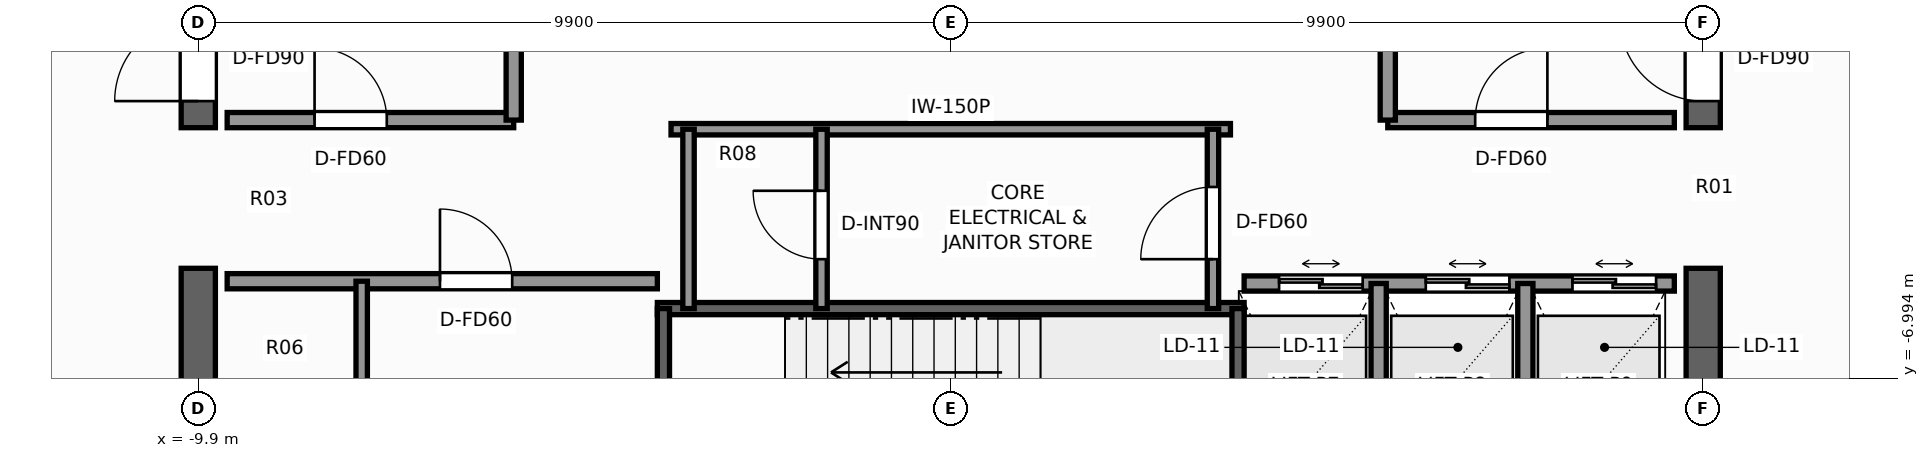
"""IFC4 building model, lengths in metres.
Left out: names, types, materials, properties, quantities, classifications, styles, units other than length and angle.
Written with IfcOpenShell. Run it as: python <this file> out.ifc"""

import sys

from ifc_helpers import new_model, si_unit, direction, frame, frame_2d, origin, place, context, subcontext, project, spatial, rectangle, extrude, element, fill, save


model = new_model("IFC4")
c1 = context("Model", 3, precision=1e-05, world=origin(), true_north=direction((0.0, 1.0)))
c2 = subcontext(c1, "Body", "Model", "MODEL_VIEW")
j1 = project(units=[si_unit("LENGTHUNIT", "METRE"), si_unit("PLANEANGLEUNIT", "RADIAN")], contexts=[c1])
p1 = place(None, origin())
s1 = spatial("IfcSite", under=j1, at=p1, CompositionType="ELEMENT")
p2 = place(p1, origin())
s2 = spatial("IfcBuilding", under=s1, at=p2, CompositionType="ELEMENT")
p3 = place(p2, frame((0.0, 0.0, 258.4)))
s3 = spatial("IfcBuildingStorey", under=s2, at=p3, CompositionType="ELEMENT", Elevation=258.4)
for number, where, z_axis, x_axis in (
    (1, (-9.9, -9.675, 0.0), (0.0, 0.0, 1.0), (0.0, 1.0, 0.0)),
    (2, (9.9, -9.675, 0.0), (0.0, 0.0, 1.0), (0.0, 1.0, 0.0)),
):
    element("IfcWall", number, at=place(p3, frame(where, z_axis=z_axis, x_axis=x_axis)), inside=s3, PredefinedType="SHEAR", context=c2, shape_type="SweptSolid", body=[
        extrude(rectangle(XDim=4.125, YDim=0.45, at=frame_2d((2.062, 0.0))), origin(), (0.0, 0.0, 1.0), 4.4),
    ])
p4 = place(p3, frame((-9.9, -3.7, 0.0), z_axis=(0.0, 0.0, 1.0), x_axis=(0.0, 1.0, 0.0)))
e3 = element("IfcWall", 3, at=p4, inside=s3, PredefinedType="SHEAR", context=c2, shape_type="SweptSolid", body=[
    extrude(rectangle(XDim=13.375, YDim=0.45, at=frame_2d((6.688, 0.0))), origin(), (0.0, 0.0, 1.0), 4.4),
])
p5 = place(p4, frame((0.35, 0.0, 0.0)))
e4 = element("IfcOpeningElement", 4, at=p5, cuts=e3, PredefinedType="OPENING", context=c2, shape_type="SweptSolid", body=[
    extrude(rectangle(XDim=1.1, YDim=2.2, at=frame_2d((0.55, 1.1))), frame((0.0, 0.235, 0.0), z_axis=(0.0, -1.0, 0.0), x_axis=(1.0, 0.0, 0.0)), (0.0, 0.0, 1.0), 0.47),
])
p6 = place(p3, frame((9.9, -3.7, 0.0), z_axis=(0.0, 0.0, 1.0), x_axis=(0.0, 1.0, 0.0)))
e5 = element("IfcWall", 5, at=p6, inside=s3, PredefinedType="SHEAR", context=c2, shape_type="SweptSolid", body=[
    extrude(rectangle(XDim=13.375, YDim=0.45, at=frame_2d((6.688, 0.0))), origin(), (0.0, 0.0, 1.0), 4.4),
])
p7 = place(p6, frame((0.35, 0.0, 0.0)))
e6 = element("IfcOpeningElement", 6, at=p7, cuts=e5, PredefinedType="OPENING", context=c2, shape_type="SweptSolid", body=[
    extrude(rectangle(XDim=1.1, YDim=2.2, at=frame_2d((0.55, 1.1))), frame((0.0, 0.235, 0.0), z_axis=(0.0, -1.0, 0.0), x_axis=(1.0, 0.0, 0.0)), (0.0, 0.0, 1.0), 0.47),
])
p8 = place(p3, frame((-3.86, -6.08, 0.0), z_axis=(0.0, 0.0, 1.0), x_axis=(1.0, 0.0, 0.0)))
e7 = element("IfcWall", 7, at=p8, inside=s3, PredefinedType="SHEAR", context=c2, shape_type="SweptSolid", body=[
    extrude(rectangle(XDim=7.72, YDim=0.16, at=frame_2d((3.86, 0.0))), origin(), (0.0, 0.0, 1.0), 4.4),
])
for number, where, z_axis, x_axis in (
    (8, (-3.78, -9.43, 0.0), (0.0, 0.0, 1.0), (0.0, 1.0, 0.0)),
    (9, (3.78, -9.43, 0.0), (0.0, 0.0, 1.0), (0.0, 1.0, 0.0)),
):
    element("IfcWall", number, at=place(p3, frame(where, z_axis=z_axis, x_axis=x_axis)), inside=s3, PredefinedType="SHEAR", context=c2, shape_type="SweptSolid", body=[
        extrude(rectangle(XDim=3.35, YDim=0.16, at=frame_2d((1.675, 0.0))), origin(), (0.0, 0.0, 1.0), 4.4),
    ])
p9 = place(p3, frame((-9.52, -3.6, 0.0), z_axis=(0.0, 0.0, 1.0), x_axis=(1.0, 0.0, 0.0)))
e10 = element("IfcWall", 10, at=p9, inside=s3, PredefinedType="SOLIDWALL", context=c2, shape_type="SweptSolid", body=[
    extrude(rectangle(XDim=3.77, YDim=0.2, at=frame_2d((1.885, 0.0))), origin(), (0.0, 0.0, 1.0), 4.12),
])
p10 = place(p9, frame((1.15, 0.0, 0.0)))
e11 = element("IfcOpeningElement", 11, at=p10, cuts=e10, PredefinedType="OPENING", context=c2, shape_type="SweptSolid", body=[
    extrude(rectangle(XDim=0.95, YDim=2.06, at=frame_2d((0.475, 1.03))), frame((0.0, 0.11, 0.0), z_axis=(0.0, -1.0, 0.0), x_axis=(1.0, 0.0, 0.0)), (0.0, 0.0, 1.0), 0.22),
])
p11 = place(p3, frame((-5.75, -3.6, 0.0), z_axis=(0.0, 0.0, 1.0), x_axis=(0.0, 1.0, 0.0)))
e12 = element("IfcWall", 12, at=p11, inside=s3, PredefinedType="SOLIDWALL", context=c2, shape_type="SweptSolid", body=[
    extrude(rectangle(XDim=5.57, YDim=0.2, at=frame_2d((2.785, 0.0))), origin(), (0.0, 0.0, 1.0), 4.12),
])
p12 = place(p11, frame((2.75, 0.0, 0.0)))
e13 = element("IfcOpeningElement", 13, at=p12, cuts=e12, PredefinedType="OPENING", context=c2, shape_type="SweptSolid", body=[
    extrude(rectangle(XDim=1.1, YDim=2.2, at=frame_2d((0.55, 1.1))), frame((0.0, 0.11, 0.0), z_axis=(0.0, -1.0, 0.0), x_axis=(1.0, 0.0, 0.0)), (0.0, 0.0, 1.0), 0.22),
])
p13 = place(p3, frame((5.75, -3.6, 0.0), z_axis=(0.0, 0.0, 1.0), x_axis=(1.0, 0.0, 0.0)))
e14 = element("IfcWall", 14, at=p13, inside=s3, PredefinedType="SOLIDWALL", context=c2, shape_type="SweptSolid", body=[
    extrude(rectangle(XDim=3.77, YDim=0.2, at=frame_2d((1.885, 0.0))), origin(), (0.0, 0.0, 1.0), 4.12),
])
p14 = place(p13, frame((1.15, 0.0, 0.0)))
e15 = element("IfcOpeningElement", 15, at=p14, cuts=e14, PredefinedType="OPENING", context=c2, shape_type="SweptSolid", body=[
    extrude(rectangle(XDim=0.95, YDim=2.06, at=frame_2d((0.475, 1.03))), frame((0.0, 0.11, 0.0), z_axis=(0.0, -1.0, 0.0), x_axis=(1.0, 0.0, 0.0)), (0.0, 0.0, 1.0), 0.22),
])
p15 = place(p3, frame((5.75, -3.6, 0.0), z_axis=(0.0, 0.0, 1.0), x_axis=(0.0, 1.0, 0.0)))
e16 = element("IfcWall", 16, at=p15, inside=s3, PredefinedType="SOLIDWALL", context=c2, shape_type="SweptSolid", body=[
    extrude(rectangle(XDim=5.57, YDim=0.2, at=frame_2d((2.785, 0.0))), origin(), (0.0, 0.0, 1.0), 4.12),
])
p16 = place(p15, frame((2.75, 0.0, 0.0)))
e17 = element("IfcOpeningElement", 17, at=p16, cuts=e16, PredefinedType="OPENING", context=c2, shape_type="SweptSolid", body=[
    extrude(rectangle(XDim=1.1, YDim=2.2, at=frame_2d((0.55, 1.1))), frame((0.0, 0.11, 0.0), z_axis=(0.0, -1.0, 0.0), x_axis=(1.0, 0.0, 0.0)), (0.0, 0.0, 1.0), 0.22),
])
p17 = place(p3, frame((-9.52, -5.72, 0.0), z_axis=(0.0, 0.0, 1.0), x_axis=(1.0, 0.0, 0.0)))
e18 = element("IfcWall", 18, at=p17, inside=s3, PredefinedType="SOLIDWALL", context=c2, shape_type="SweptSolid", body=[
    extrude(rectangle(XDim=5.66, YDim=0.2, at=frame_2d((2.83, 0.0))), origin(), (0.0, 0.0, 1.0), 4.12),
])
p18 = place(p17, frame((2.8, 0.0, 0.0)))
e19 = element("IfcOpeningElement", 19, at=p18, cuts=e18, PredefinedType="OPENING", context=c2, shape_type="SweptSolid", body=[
    extrude(rectangle(XDim=0.95, YDim=2.06, at=frame_2d((0.475, 1.03))), frame((0.0, 0.11, 0.0), z_axis=(0.0, -1.0, 0.0), x_axis=(1.0, 0.0, 0.0)), (0.0, 0.0, 1.0), 0.22),
])
p19 = place(p3, frame((-7.75, -9.52, 0.0), z_axis=(0.0, 0.0, 1.0), x_axis=(0.0, 1.0, 0.0)))
e20 = element("IfcWall", 20, at=p19, inside=s3, PredefinedType="PARTITIONING", context=c2, shape_type="SweptSolid", body=[
    extrude(rectangle(XDim=3.8, YDim=0.15, at=frame_2d((1.9, 0.0))), origin(), (0.0, 0.0, 1.0), 4.12),
])
p20 = place(p19, frame((0.9, 0.0, 0.0)))
e21 = element("IfcOpeningElement", 21, at=p20, cuts=e20, PredefinedType="OPENING", context=c2, shape_type="SweptSolid", body=[
    extrude(rectangle(XDim=0.85, YDim=2.03, at=frame_2d((0.425, 1.015))), frame((0.0, 0.085, 0.0), z_axis=(0.0, -1.0, 0.0), x_axis=(1.0, 0.0, 0.0)), (0.0, 0.0, 1.0), 0.17),
])
p21 = place(p3, frame((3.86, -5.75, 0.0), z_axis=(0.0, 0.0, 1.0), x_axis=(1.0, 0.0, 0.0)))
e22 = element("IfcWall", 22, at=p21, inside=s3, PredefinedType="SOLIDWALL", context=c2, shape_type="SweptSolid", body=[
    extrude(rectangle(XDim=5.66, YDim=0.2, at=frame_2d((2.83, 0.0))), origin(), (0.0, 0.0, 1.0), 4.12),
])
p22 = place(p21, frame((0.46, 0.0, 0.0)))
e23 = element("IfcOpeningElement", 23, at=p22, cuts=e22, PredefinedType="OPENING", context=c2, shape_type="SweptSolid", body=[
    extrude(rectangle(XDim=1.1, YDim=2.2, at=frame_2d((0.55, 1.1))), frame((0.0, 0.11, 0.0), z_axis=(0.0, -1.0, 0.0), x_axis=(1.0, 0.0, 0.0)), (0.0, 0.0, 1.0), 0.22),
])
p23 = place(p21, frame((2.39, 0.0, 0.0)))
e24 = element("IfcOpeningElement", 24, at=p23, cuts=e22, PredefinedType="OPENING", context=c2, shape_type="SweptSolid", body=[
    extrude(rectangle(XDim=1.1, YDim=2.2, at=frame_2d((0.55, 1.1))), frame((0.0, 0.11, 0.0), z_axis=(0.0, -1.0, 0.0), x_axis=(1.0, 0.0, 0.0)), (0.0, 0.0, 1.0), 0.22),
])
p24 = place(p21, frame((4.32, 0.0, 0.0)))
e25 = element("IfcOpeningElement", 25, at=p24, cuts=e22, PredefinedType="OPENING", context=c2, shape_type="SweptSolid", body=[
    extrude(rectangle(XDim=1.1, YDim=2.2, at=frame_2d((0.55, 1.1))), frame((0.0, 0.11, 0.0), z_axis=(0.0, -1.0, 0.0), x_axis=(1.0, 0.0, 0.0)), (0.0, 0.0, 1.0), 0.22),
])
for number, where, z_axis, x_axis in (
    (26, (5.63, -9.52, 0.0), (0.0, 0.0, 1.0), (0.0, 1.0, 0.0)),
    (27, (7.56, -9.52, 0.0), (0.0, 0.0, 1.0), (0.0, 1.0, 0.0)),
):
    element("IfcWall", number, at=place(p3, frame(where, z_axis=z_axis, x_axis=x_axis)), inside=s3, PredefinedType="SOLIDWALL", context=c2, shape_type="SweptSolid", body=[
        extrude(rectangle(XDim=3.77, YDim=0.2, at=frame_2d((1.885, 0.0))), origin(), (0.0, 0.0, 1.0), 4.12),
    ])
p25 = place(p3, frame((-3.68, -3.72, 0.0), z_axis=(0.0, 0.0, 1.0), x_axis=(1.0, 0.0, 0.0)))
e28 = element("IfcWall", 28, at=p25, inside=s3, PredefinedType="PARTITIONING", context=c2, shape_type="SweptSolid", body=[
    extrude(rectangle(XDim=7.36, YDim=0.15, at=frame_2d((3.68, 0.0))), origin(), (0.0, 0.0, 1.0), 4.12),
])
p26 = place(p3, frame((3.45, -6.08, 0.0), z_axis=(0.0, 0.0, 1.0), x_axis=(0.0, 1.0, 0.0)))
e29 = element("IfcWall", 29, at=p26, inside=s3, PredefinedType="PARTITIONING", context=c2, shape_type="SweptSolid", body=[
    extrude(rectangle(XDim=2.36, YDim=0.15, at=frame_2d((1.18, 0.0))), origin(), (0.0, 0.0, 1.0), 4.12),
])
p27 = place(p26, frame((0.65, 0.0, 0.0)))
e30 = element("IfcOpeningElement", 30, at=p27, cuts=e29, PredefinedType="OPENING", context=c2, shape_type="SweptSolid", body=[
    extrude(rectangle(XDim=0.95, YDim=2.06, at=frame_2d((0.475, 1.03))), frame((0.0, 0.085, 0.0), z_axis=(0.0, -1.0, 0.0), x_axis=(1.0, 0.0, 0.0)), (0.0, 0.0, 1.0), 0.17),
])
p28 = place(p3, frame((-3.45, -6.08, 0.0), z_axis=(0.0, 0.0, 1.0), x_axis=(0.0, 1.0, 0.0)))
e31 = element("IfcWall", 31, at=p28, inside=s3, PredefinedType="PARTITIONING", context=c2, shape_type="SweptSolid", body=[
    extrude(rectangle(XDim=2.36, YDim=0.15, at=frame_2d((1.18, 0.0))), origin(), (0.0, 0.0, 1.0), 4.12),
])
p29 = place(p3, frame((-1.7, -6.08, 0.0), z_axis=(0.0, 0.0, 1.0), x_axis=(0.0, 1.0, 0.0)))
e32 = element("IfcWall", 32, at=p29, inside=s3, PredefinedType="PARTITIONING", context=c2, shape_type="SweptSolid", body=[
    extrude(rectangle(XDim=2.36, YDim=0.15, at=frame_2d((1.18, 0.0))), origin(), (0.0, 0.0, 1.0), 4.12),
])
p30 = place(p29, frame((0.65, 0.0, 0.0)))
e33 = element("IfcOpeningElement", 33, at=p30, cuts=e32, PredefinedType="OPENING", context=c2, shape_type="SweptSolid", body=[
    extrude(rectangle(XDim=0.9, YDim=2.06, at=frame_2d((0.45, 1.03))), frame((0.0, 0.085, 0.0), z_axis=(0.0, -1.0, 0.0), x_axis=(1.0, 0.0, 0.0)), (0.0, 0.0, 1.0), 0.17),
])
p31 = place(p5, origin())
e34 = element("IfcDoor", 34, at=p31, inside=s3, OperationType="SINGLE_SWING_LEFT", PredefinedType="DOOR", context=c2, shape_type="SweptSolid", body=[
    extrude(rectangle(XDim=1.1, YDim=2.2, at=frame_2d((0.55, 1.1))), frame((0.0, 0.025, 0.0), z_axis=(0.0, -1.0, 0.0), x_axis=(1.0, 0.0, 0.0)), (0.0, 0.0, 1.0), 0.05),
])
fill(e4, e34)
p32 = place(p7, origin())
e35 = element("IfcDoor", 35, at=p32, inside=s3, OperationType="SINGLE_SWING_RIGHT", PredefinedType="DOOR", context=c2, shape_type="SweptSolid", body=[
    extrude(rectangle(XDim=1.1, YDim=2.2, at=frame_2d((0.55, 1.1))), frame((0.0, 0.025, 0.0), z_axis=(0.0, -1.0, 0.0), x_axis=(1.0, 0.0, 0.0)), (0.0, 0.0, 1.0), 0.05),
])
fill(e6, e35)
p33 = place(p18, origin())
e36 = element("IfcDoor", 36, at=p33, inside=s3, OperationType="SINGLE_SWING_LEFT", PredefinedType="DOOR", context=c2, shape_type="SweptSolid", body=[
    extrude(rectangle(XDim=0.95, YDim=2.06, at=frame_2d((0.475, 1.03))), frame((0.0, 0.025, 0.0), z_axis=(0.0, -1.0, 0.0), x_axis=(1.0, 0.0, 0.0)), (0.0, 0.0, 1.0), 0.05),
])
fill(e19, e36)
p34 = place(p10, origin())
e37 = element("IfcDoor", 37, at=p34, inside=s3, OperationType="SINGLE_SWING_LEFT", PredefinedType="DOOR", context=c2, shape_type="SweptSolid", body=[
    extrude(rectangle(XDim=0.95, YDim=2.06, at=frame_2d((0.475, 1.03))), frame((0.0, 0.025, 0.0), z_axis=(0.0, -1.0, 0.0), x_axis=(1.0, 0.0, 0.0)), (0.0, 0.0, 1.0), 0.05),
])
fill(e11, e37)
p35 = place(p22, origin())
e38 = element("IfcDoor", 38, at=p35, inside=s3, OperationType="DOUBLE_DOOR_SLIDING", PredefinedType="DOOR", context=c2, shape_type="SweptSolid", body=[
    extrude(rectangle(XDim=1.1, YDim=2.2, at=frame_2d((0.55, 1.1))), frame((0.0, 0.025, 0.0), z_axis=(0.0, -1.0, 0.0), x_axis=(1.0, 0.0, 0.0)), (0.0, 0.0, 1.0), 0.05),
])
fill(e23, e38)
p36 = place(p23, origin())
e39 = element("IfcDoor", 39, at=p36, inside=s3, OperationType="DOUBLE_DOOR_SLIDING", PredefinedType="DOOR", context=c2, shape_type="SweptSolid", body=[
    extrude(rectangle(XDim=1.1, YDim=2.2, at=frame_2d((0.55, 1.1))), frame((0.0, 0.025, 0.0), z_axis=(0.0, -1.0, 0.0), x_axis=(1.0, 0.0, 0.0)), (0.0, 0.0, 1.0), 0.05),
])
fill(e24, e39)
p37 = place(p24, origin())
e40 = element("IfcDoor", 40, at=p37, inside=s3, OperationType="DOUBLE_DOOR_SLIDING", PredefinedType="DOOR", context=c2, shape_type="SweptSolid", body=[
    extrude(rectangle(XDim=1.1, YDim=2.2, at=frame_2d((0.55, 1.1))), frame((0.0, 0.025, 0.0), z_axis=(0.0, -1.0, 0.0), x_axis=(1.0, 0.0, 0.0)), (0.0, 0.0, 1.0), 0.05),
])
fill(e25, e40)
p38 = place(p14, origin())
e41 = element("IfcDoor", 41, at=p38, inside=s3, OperationType="SINGLE_SWING_RIGHT", PredefinedType="DOOR", context=c2, shape_type="SweptSolid", body=[
    extrude(rectangle(XDim=0.95, YDim=2.06, at=frame_2d((0.475, 1.03))), frame((0.0, 0.025, 0.0), z_axis=(0.0, -1.0, 0.0), x_axis=(1.0, 0.0, 0.0)), (0.0, 0.0, 1.0), 0.05),
])
fill(e15, e41)
p39 = place(p27, origin())
e42 = element("IfcDoor", 42, at=p39, inside=s3, OperationType="SINGLE_SWING_LEFT", PredefinedType="DOOR", context=c2, shape_type="SweptSolid", body=[
    extrude(rectangle(XDim=0.95, YDim=2.06, at=frame_2d((0.475, 1.03))), frame((0.0, 0.025, 0.0), z_axis=(0.0, -1.0, 0.0), x_axis=(1.0, 0.0, 0.0)), (0.0, 0.0, 1.0), 0.05),
])
fill(e30, e42)
p40 = place(p30, origin())
e43 = element("IfcDoor", 43, at=p40, inside=s3, OperationType="SINGLE_SWING_RIGHT", PredefinedType="DOOR", context=c2, shape_type="SweptSolid", body=[
    extrude(rectangle(XDim=0.9, YDim=2.06, at=frame_2d((0.45, 1.03))), frame((0.0, 0.025, 0.0), z_axis=(0.0, -1.0, 0.0), x_axis=(1.0, 0.0, 0.0)), (0.0, 0.0, 1.0), 0.05),
])
fill(e33, e43)
save(model, sys.argv[1])
